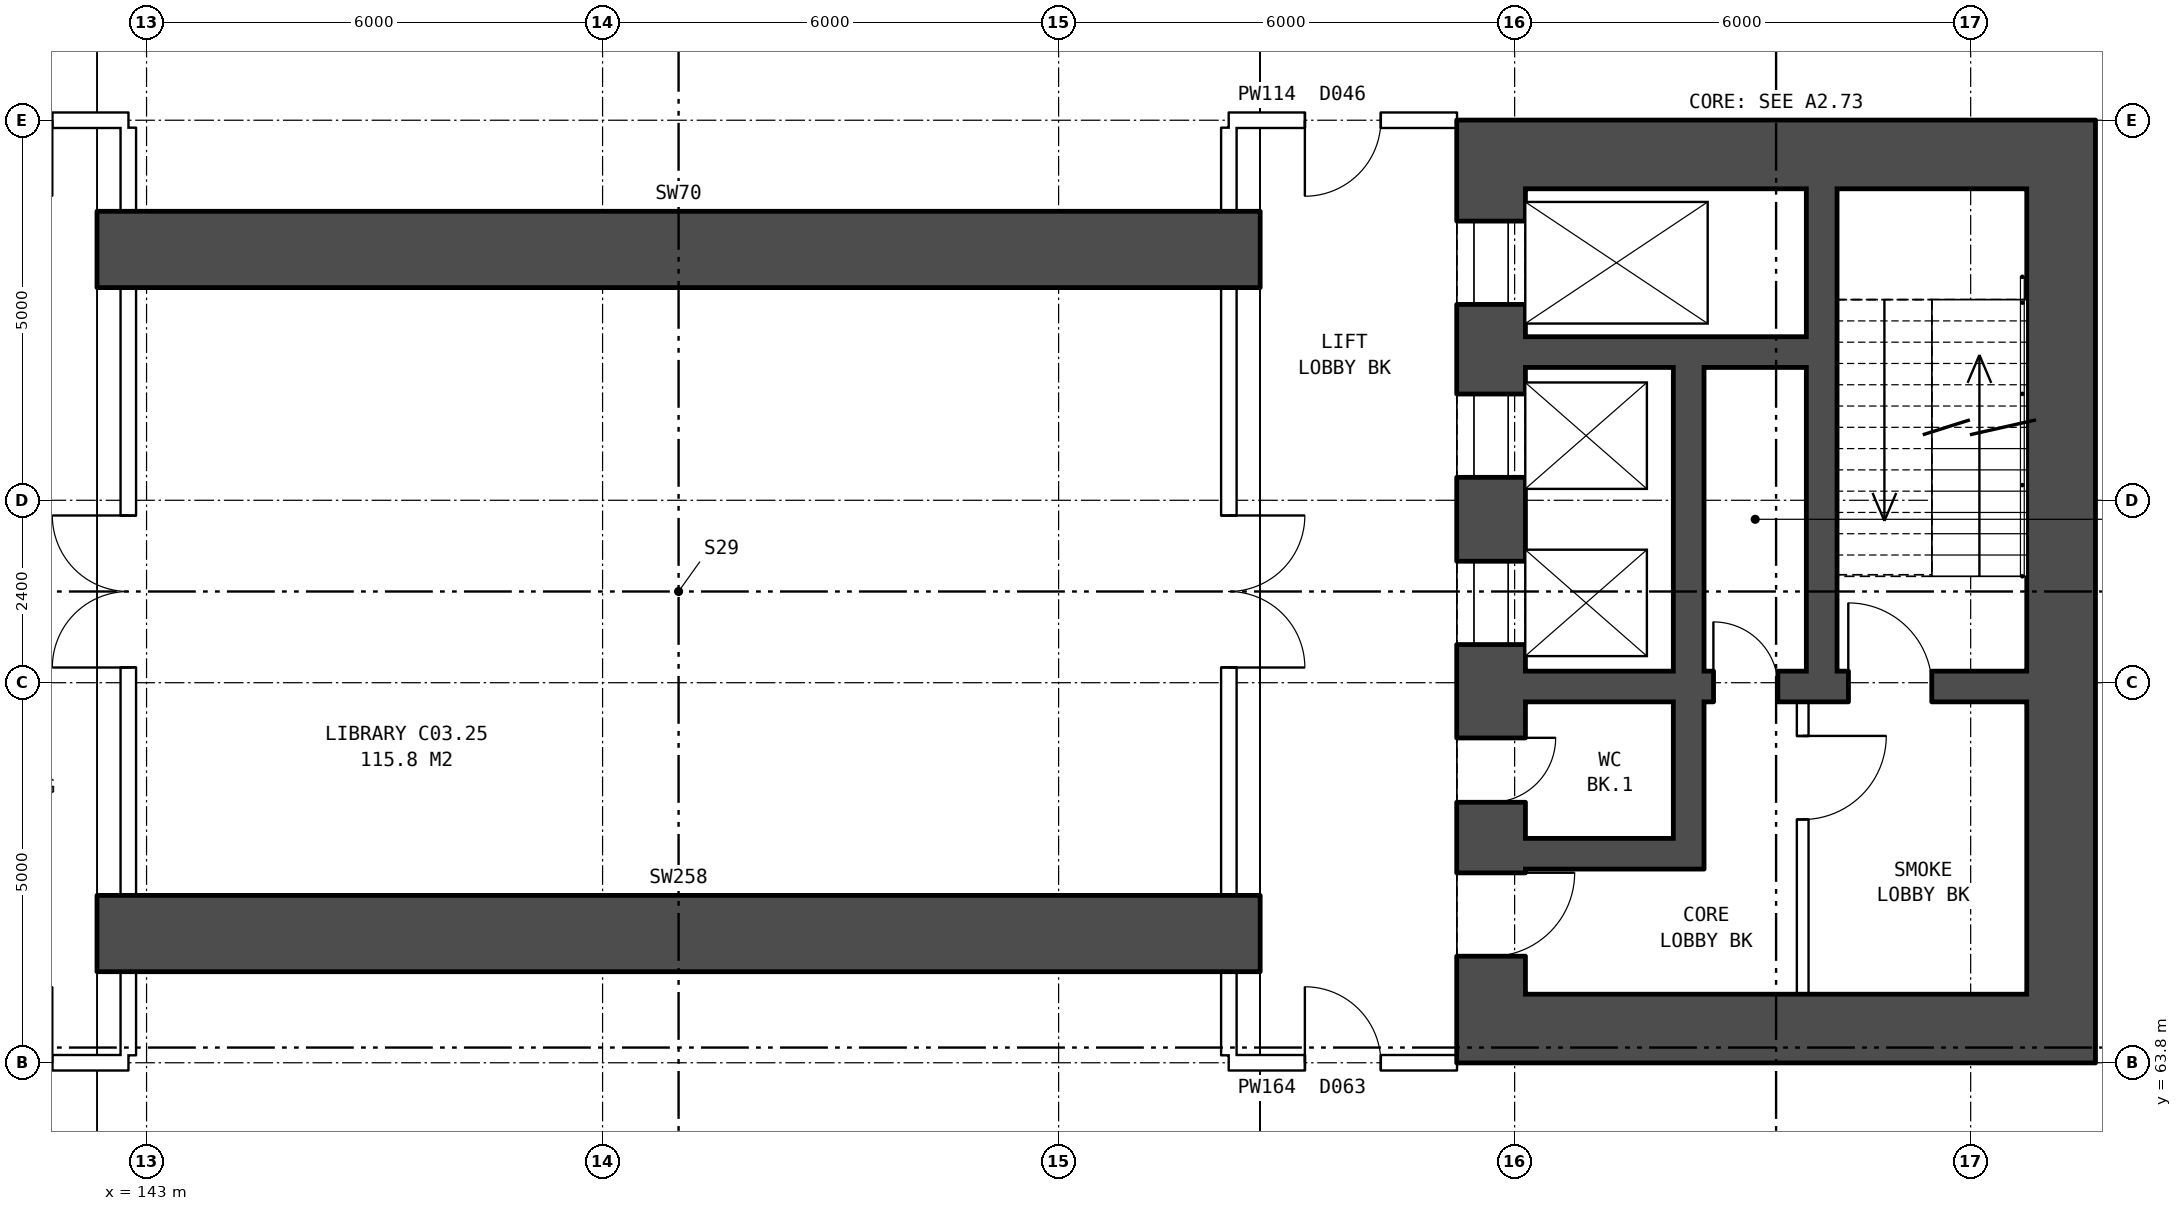
"""IFC4 building model, lengths in metres.
Left out: names, types, materials, properties, quantities, classifications, styles, units other than length and angle.
Written with IfcOpenShell. Run it as: python <this file> out.ifc"""

import sys

from ifc_helpers import new_model, si_unit, direction, frame, frame_2d, origin, place, context, subcontext, project, spatial, rectangle, extrude, element, fill, save


model = new_model("IFC4")
c1 = context("Model", 3, precision=1e-05, world=origin(), true_north=direction((0.0, 1.0)))
c2 = subcontext(c1, "Body", "Model", "MODEL_VIEW")
j1 = project(units=[si_unit("LENGTHUNIT", "METRE"), si_unit("PLANEANGLEUNIT", "RADIAN")], contexts=[c1])
p1 = place(None, origin())
s1 = spatial("IfcSite", under=j1, at=p1, CompositionType="ELEMENT")
p2 = place(p1, origin())
s2 = spatial("IfcBuilding", under=s1, at=p2, CompositionType="ELEMENT")
p3 = place(p2, frame((0.0, 0.0, 14.7)))
s3 = spatial("IfcBuildingStorey", under=s2, at=p3, CompositionType="ELEMENT", Elevation=14.7)
for number, where, z_axis, x_axis in (
    (1, (142.35, 65.5, 0.0), (0.0, 0.0, 1.0), (1.0, 0.0, 0.0)),
    (2, (142.35, 74.5, 0.0), (0.0, 0.0, 1.0), (1.0, 0.0, 0.0)),
):
    element("IfcWall", number, at=place(p3, frame(where, z_axis=z_axis, x_axis=x_axis)), inside=s3, PredefinedType="SHEAR", context=c2, shape_type="SweptSolid", body=[
        extrude(rectangle(XDim=15.3, YDim=1.0, at=frame_2d((7.65, 0.0))), origin(), (0.0, 0.0, 1.0), 4.0),
    ])
p4 = place(p3, frame((142.76, 63.9, 0.0), z_axis=(0.0, 0.0, 1.0), x_axis=(0.0, 1.0, 0.0)))
e3 = element("IfcWall", 3, at=p4, inside=s3, PredefinedType="PARTITIONING", context=c2, shape_type="SweptSolid", body=[
    extrude(rectangle(XDim=12.2, YDim=0.2, at=frame_2d((6.1, 0.0))), origin(), (0.0, 0.0, 1.0), 4.0),
])
p5 = place(p4, frame((5.1, 0.0, 0.0)))
e4 = element("IfcOpeningElement", 4, at=p5, cuts=e3, PredefinedType="OPENING", context=c2, shape_type="SweptSolid", body=[
    extrude(rectangle(XDim=2.0, YDim=2.1, at=frame_2d((1.0, 1.05))), frame((0.0, 0.11, 0.0), z_axis=(0.0, -1.0, 0.0), x_axis=(1.0, 0.0, 0.0)), (0.0, 0.0, 1.0), 0.22),
])
p6 = place(p3, frame((160.69, 75.3, 0.0), z_axis=(0.0, 0.0, 1.0), x_axis=(0.0, -1.0, 0.0)))
e5 = element("IfcWall", 5, at=p6, inside=s3, PredefinedType="SHEAR", context=c2, shape_type="SweptSolid", body=[
    extrude(rectangle(XDim=10.6, YDim=0.9, at=frame_2d((5.3, 0.0))), origin(), (0.0, 0.0, 1.0), 4.0),
])
p7 = place(p6, frame((0.425, 0.0, 0.0)))
e6 = element("IfcOpeningElement", 6, at=p7, cuts=e5, PredefinedType="OPENING", context=c2, shape_type="SweptSolid", body=[
    extrude(rectangle(XDim=1.1, YDim=2.1, at=frame_2d((0.55, 1.05))), frame((0.0, 0.46, 0.0), z_axis=(0.0, -1.0, 0.0), x_axis=(1.0, 0.0, 0.0)), (0.0, 0.0, 1.0), 0.92),
])
p8 = place(p6, frame((2.7, 0.0, 0.0)))
e7 = element("IfcOpeningElement", 7, at=p8, cuts=e5, PredefinedType="OPENING", context=c2, shape_type="SweptSolid", body=[
    extrude(rectangle(XDim=1.1, YDim=2.1, at=frame_2d((0.55, 1.05))), frame((0.0, 0.46, 0.0), z_axis=(0.0, -1.0, 0.0), x_axis=(1.0, 0.0, 0.0)), (0.0, 0.0, 1.0), 0.92),
])
p9 = place(p6, frame((4.9, 0.0, 0.0)))
e8 = element("IfcOpeningElement", 8, at=p9, cuts=e5, PredefinedType="OPENING", context=c2, shape_type="SweptSolid", body=[
    extrude(rectangle(XDim=1.1, YDim=2.1, at=frame_2d((0.55, 1.05))), frame((0.0, 0.46, 0.0), z_axis=(0.0, -1.0, 0.0), x_axis=(1.0, 0.0, 0.0)), (0.0, 0.0, 1.0), 0.92),
])
p10 = place(p6, frame((9.0, 0.0, 0.0)))
e9 = element("IfcOpeningElement", 9, at=p10, cuts=e5, PredefinedType="OPENING", context=c2, shape_type="SweptSolid", body=[
    extrude(rectangle(XDim=1.1, YDim=2.1, at=frame_2d((0.55, 1.05))), frame((0.0, 0.46, 0.0), z_axis=(0.0, -1.0, 0.0), x_axis=(1.0, 0.0, 0.0)), (0.0, 0.0, 1.0), 0.92),
])
p11 = place(p6, frame((7.225, 0.0, 0.0)))
e10 = element("IfcOpeningElement", 10, at=p11, cuts=e5, PredefinedType="OPENING", context=c2, shape_type="SweptSolid", body=[
    extrude(rectangle(XDim=0.85, YDim=2.1, at=frame_2d((0.425, 1.05))), frame((0.0, 0.46, 0.0), z_axis=(0.0, -1.0, 0.0), x_axis=(1.0, 0.0, 0.0)), (0.0, 0.0, 1.0), 0.92),
])
p12 = place(p3, frame((168.19, 75.3, 0.0), z_axis=(0.0, 0.0, 1.0), x_axis=(0.0, -1.0, 0.0)))
e11 = element("IfcWall", 11, at=p12, inside=s3, PredefinedType="SHEAR", context=c2, shape_type="SweptSolid", body=[
    extrude(rectangle(XDim=10.6, YDim=0.9, at=frame_2d((5.3, 0.0))), origin(), (0.0, 0.0, 1.0), 4.0),
])
for number, where, z_axis, x_axis in (
    (12, (160.24, 75.75, 0.0), (0.0, 0.0, 1.0), (1.0, 0.0, 0.0)),
    (13, (160.24, 64.25, 0.0), (0.0, 0.0, 1.0), (1.0, 0.0, 0.0)),
):
    element("IfcWall", number, at=place(p3, frame(where, z_axis=z_axis, x_axis=x_axis)), inside=s3, PredefinedType="SHEAR", context=c2, shape_type="SweptSolid", body=[
        extrude(rectangle(XDim=8.4, YDim=0.9, at=frame_2d((4.2, 0.0))), origin(), (0.0, 0.0, 1.0), 4.0),
    ])
p13 = place(p3, frame((161.14, 73.15, 0.0), z_axis=(0.0, 0.0, 1.0), x_axis=(1.0, 0.0, 0.0)))
e14 = element("IfcWall", 14, at=p13, inside=s3, PredefinedType="SHEAR", context=c2, shape_type="SweptSolid", body=[
    extrude(rectangle(XDim=3.7, YDim=0.4, at=frame_2d((1.85, 0.0))), origin(), (0.0, 0.0, 1.0), 4.0),
])
p14 = place(p3, frame((161.14, 68.75, 0.0), z_axis=(0.0, 0.0, 1.0), x_axis=(1.0, 0.0, 0.0)))
e15 = element("IfcWall", 15, at=p14, inside=s3, PredefinedType="SHEAR", context=c2, shape_type="SweptSolid", body=[
    extrude(rectangle(XDim=6.6, YDim=0.4, at=frame_2d((3.3, 0.0))), origin(), (0.0, 0.0, 1.0), 4.0),
])
p15 = place(p14, frame((4.25, 0.0, 0.0)))
e16 = element("IfcOpeningElement", 16, at=p15, cuts=e15, PredefinedType="OPENING", context=c2, shape_type="SweptSolid", body=[
    extrude(rectangle(XDim=1.1, YDim=2.1, at=frame_2d((0.55, 1.05))), frame((0.0, 0.21, 0.0), z_axis=(0.0, -1.0, 0.0), x_axis=(1.0, 0.0, 0.0)), (0.0, 0.0, 1.0), 0.42),
])
p16 = place(p14, frame((2.475, 0.0, 0.0)))
e17 = element("IfcOpeningElement", 17, at=p16, cuts=e15, PredefinedType="OPENING", context=c2, shape_type="SweptSolid", body=[
    extrude(rectangle(XDim=0.85, YDim=2.1, at=frame_2d((0.425, 1.05))), frame((0.0, 0.21, 0.0), z_axis=(0.0, -1.0, 0.0), x_axis=(1.0, 0.0, 0.0)), (0.0, 0.0, 1.0), 0.42),
])
p17 = place(p3, frame((161.14, 66.55, 0.0), z_axis=(0.0, 0.0, 1.0), x_axis=(1.0, 0.0, 0.0)))
e18 = element("IfcWall", 18, at=p17, inside=s3, PredefinedType="SHEAR", context=c2, shape_type="SweptSolid", body=[
    extrude(rectangle(XDim=1.95, YDim=0.4, at=frame_2d((0.975, 0.0))), origin(), (0.0, 0.0, 1.0), 4.0),
])
p18 = place(p3, frame((163.29, 72.95, 0.0), z_axis=(0.0, 0.0, 1.0), x_axis=(0.0, -1.0, 0.0)))
e19 = element("IfcWall", 19, at=p18, inside=s3, PredefinedType="SHEAR", context=c2, shape_type="SweptSolid", body=[
    extrude(rectangle(XDim=4.0, YDim=0.4, at=frame_2d((2.0, 0.0))), origin(), (0.0, 0.0, 1.0), 4.0),
])
p19 = place(p3, frame((163.29, 68.55, 0.0), z_axis=(0.0, 0.0, 1.0), x_axis=(0.0, -1.0, 0.0)))
e20 = element("IfcWall", 20, at=p19, inside=s3, PredefinedType="SHEAR", context=c2, shape_type="SweptSolid", body=[
    extrude(rectangle(XDim=2.2, YDim=0.4, at=frame_2d((1.1, 0.0))), origin(), (0.0, 0.0, 1.0), 4.0),
])
p20 = place(p3, frame((164.79, 68.55, 0.0), z_axis=(0.0, 0.0, 1.0), x_axis=(0.0, -1.0, 0.0)))
e21 = element("IfcWall", 21, at=p20, inside=s3, PredefinedType="PARTITIONING", context=c2, shape_type="SweptSolid", body=[
    extrude(rectangle(XDim=3.85, YDim=0.15, at=frame_2d((1.925, 0.0))), origin(), (0.0, 0.0, 1.0), 4.0),
])
p21 = place(p20, frame((0.45, 0.0, 0.0)))
e22 = element("IfcOpeningElement", 22, at=p21, cuts=e21, PredefinedType="OPENING", context=c2, shape_type="SweptSolid", body=[
    extrude(rectangle(XDim=1.1, YDim=2.1, at=frame_2d((0.55, 1.05))), frame((0.0, 0.085, 0.0), z_axis=(0.0, -1.0, 0.0), x_axis=(1.0, 0.0, 0.0)), (0.0, 0.0, 1.0), 0.17),
])
p22 = place(p3, frame((165.04, 75.3, 0.0), z_axis=(0.0, 0.0, 1.0), x_axis=(0.0, -1.0, 0.0)))
e23 = element("IfcWall", 23, at=p22, inside=s3, PredefinedType="SHEAR", context=c2, shape_type="SweptSolid", body=[
    extrude(rectangle(XDim=6.35, YDim=0.4, at=frame_2d((3.175, 0.0))), origin(), (0.0, 0.0, 1.0), 4.0),
])
p23 = place(p3, frame((157.24, 63.9, 0.0), z_axis=(0.0, 0.0, 1.0), x_axis=(0.0, 1.0, 0.0)))
e24 = element("IfcWall", 24, at=p23, inside=s3, PredefinedType="PARTITIONING", context=c2, shape_type="SweptSolid", body=[
    extrude(rectangle(XDim=12.2, YDim=0.2, at=frame_2d((6.1, 0.0))), origin(), (0.0, 0.0, 1.0), 4.0),
])
p24 = place(p23, frame((5.1, 0.0, 0.0)))
e25 = element("IfcOpeningElement", 25, at=p24, cuts=e24, PredefinedType="OPENING", context=c2, shape_type="SweptSolid", body=[
    extrude(rectangle(XDim=2.0, YDim=2.1, at=frame_2d((1.0, 1.05))), frame((0.0, 0.11, 0.0), z_axis=(0.0, -1.0, 0.0), x_axis=(1.0, 0.0, 0.0)), (0.0, 0.0, 1.0), 0.22),
])
p25 = place(p3, frame((139.76, 63.8, 0.0), z_axis=(0.0, 0.0, 1.0), x_axis=(1.0, 0.0, 0.0)))
e26 = element("IfcWall", 26, at=p25, inside=s3, PredefinedType="PARTITIONING", context=c2, shape_type="SweptSolid", body=[
    extrude(rectangle(XDim=3.0, YDim=0.2, at=frame_2d((1.5, 0.0))), origin(), (0.0, 0.0, 1.0), 4.0),
])
p26 = place(p25, frame((1.0, 0.0, 0.0)))
e27 = element("IfcOpeningElement", 27, at=p26, cuts=e26, PredefinedType="OPENING", context=c2, shape_type="SweptSolid", body=[
    extrude(rectangle(XDim=1.0, YDim=2.1, at=frame_2d((0.5, 1.05))), frame((0.0, 0.11, 0.0), z_axis=(0.0, -1.0, 0.0), x_axis=(1.0, 0.0, 0.0)), (0.0, 0.0, 1.0), 0.22),
])
p27 = place(p3, frame((157.24, 63.8, 0.0), z_axis=(0.0, 0.0, 1.0), x_axis=(1.0, 0.0, 0.0)))
e28 = element("IfcWall", 28, at=p27, inside=s3, PredefinedType="PARTITIONING", context=c2, shape_type="SweptSolid", body=[
    extrude(rectangle(XDim=3.0, YDim=0.2, at=frame_2d((1.5, 0.0))), origin(), (0.0, 0.0, 1.0), 4.0),
])
p28 = place(p27, frame((1.0, 0.0, 0.0)))
e29 = element("IfcOpeningElement", 29, at=p28, cuts=e28, PredefinedType="OPENING", context=c2, shape_type="SweptSolid", body=[
    extrude(rectangle(XDim=1.0, YDim=2.1, at=frame_2d((0.5, 1.05))), frame((0.0, 0.11, 0.0), z_axis=(0.0, -1.0, 0.0), x_axis=(1.0, 0.0, 0.0)), (0.0, 0.0, 1.0), 0.22),
])
p29 = place(p3, frame((139.76, 76.2, 0.0), z_axis=(0.0, 0.0, 1.0), x_axis=(1.0, 0.0, 0.0)))
e30 = element("IfcWall", 30, at=p29, inside=s3, PredefinedType="PARTITIONING", context=c2, shape_type="SweptSolid", body=[
    extrude(rectangle(XDim=3.0, YDim=0.2, at=frame_2d((1.5, 0.0))), origin(), (0.0, 0.0, 1.0), 4.0),
])
p30 = place(p29, frame((1.0, 0.0, 0.0)))
e31 = element("IfcOpeningElement", 31, at=p30, cuts=e30, PredefinedType="OPENING", context=c2, shape_type="SweptSolid", body=[
    extrude(rectangle(XDim=1.0, YDim=2.1, at=frame_2d((0.5, 1.05))), frame((0.0, 0.11, 0.0), z_axis=(0.0, -1.0, 0.0), x_axis=(1.0, 0.0, 0.0)), (0.0, 0.0, 1.0), 0.22),
])
p31 = place(p3, frame((157.24, 76.2, 0.0), z_axis=(0.0, 0.0, 1.0), x_axis=(1.0, 0.0, 0.0)))
e32 = element("IfcWall", 32, at=p31, inside=s3, PredefinedType="PARTITIONING", context=c2, shape_type="SweptSolid", body=[
    extrude(rectangle(XDim=3.0, YDim=0.2, at=frame_2d((1.5, 0.0))), origin(), (0.0, 0.0, 1.0), 4.0),
])
p32 = place(p31, frame((1.0, 0.0, 0.0)))
e33 = element("IfcOpeningElement", 33, at=p32, cuts=e32, PredefinedType="OPENING", context=c2, shape_type="SweptSolid", body=[
    extrude(rectangle(XDim=1.0, YDim=2.1, at=frame_2d((0.5, 1.05))), frame((0.0, 0.11, 0.0), z_axis=(0.0, -1.0, 0.0), x_axis=(1.0, 0.0, 0.0)), (0.0, 0.0, 1.0), 0.22),
])
p33 = place(p5, origin())
e34 = element("IfcDoor", 34, at=p33, inside=s3, OperationType="DOUBLE_DOOR_SINGLE_SWING", PredefinedType="DOOR", context=c2, shape_type="SweptSolid", body=[
    extrude(rectangle(XDim=2.0, YDim=2.1, at=frame_2d((1.0, 1.05))), frame((0.0, 0.025, 0.0), z_axis=(0.0, -1.0, 0.0), x_axis=(1.0, 0.0, 0.0)), (0.0, 0.0, 1.0), 0.05),
])
fill(e4, e34)
p34 = place(p7, origin())
e35 = element("IfcDoor", 35, at=p34, inside=s3, OperationType="DOUBLE_DOOR_SLIDING", PredefinedType="DOOR", context=c2, shape_type="SweptSolid", body=[
    extrude(rectangle(XDim=1.1, YDim=2.1, at=frame_2d((0.55, 1.05))), frame((0.0, 0.435, 0.0), z_axis=(0.0, -1.0, 0.0), x_axis=(1.0, 0.0, 0.0)), (0.0, 0.0, 1.0), 0.05),
])
fill(e6, e35)
p35 = place(p8, origin())
e36 = element("IfcDoor", 36, at=p35, inside=s3, OperationType="DOUBLE_DOOR_SLIDING", PredefinedType="DOOR", context=c2, shape_type="SweptSolid", body=[
    extrude(rectangle(XDim=1.1, YDim=2.1, at=frame_2d((0.55, 1.05))), frame((0.0, 0.435, 0.0), z_axis=(0.0, -1.0, 0.0), x_axis=(1.0, 0.0, 0.0)), (0.0, 0.0, 1.0), 0.05),
])
fill(e7, e36)
p36 = place(p9, origin())
e37 = element("IfcDoor", 37, at=p36, inside=s3, OperationType="DOUBLE_DOOR_SLIDING", PredefinedType="DOOR", context=c2, shape_type="SweptSolid", body=[
    extrude(rectangle(XDim=1.1, YDim=2.1, at=frame_2d((0.55, 1.05))), frame((0.0, 0.435, 0.0), z_axis=(0.0, -1.0, 0.0), x_axis=(1.0, 0.0, 0.0)), (0.0, 0.0, 1.0), 0.05),
])
fill(e8, e37)
p37 = place(p10, origin())
e38 = element("IfcDoor", 38, at=p37, inside=s3, OperationType="SINGLE_SWING_LEFT", PredefinedType="DOOR", context=c2, shape_type="SweptSolid", body=[
    extrude(rectangle(XDim=1.1, YDim=2.1, at=frame_2d((0.55, 1.05))), frame((0.0, 0.435, 0.0), z_axis=(0.0, -1.0, 0.0), x_axis=(1.0, 0.0, 0.0)), (0.0, 0.0, 1.0), 0.05),
])
fill(e9, e38)
p38 = place(p21, origin())
e39 = element("IfcDoor", 39, at=p38, inside=s3, OperationType="SINGLE_SWING_LEFT", PredefinedType="DOOR", context=c2, shape_type="SweptSolid", body=[
    extrude(rectangle(XDim=1.1, YDim=2.1, at=frame_2d((0.55, 1.05))), frame((0.0, 0.025, 0.0), z_axis=(0.0, -1.0, 0.0), x_axis=(1.0, 0.0, 0.0)), (0.0, 0.0, 1.0), 0.05),
])
fill(e22, e39)
p39 = place(p15, origin())
e40 = element("IfcDoor", 40, at=p39, inside=s3, OperationType="SINGLE_SWING_LEFT", PredefinedType="DOOR", context=c2, shape_type="SweptSolid", body=[
    extrude(rectangle(XDim=1.1, YDim=2.1, at=frame_2d((0.55, 1.05))), frame((0.0, 0.025, 0.0), z_axis=(0.0, -1.0, 0.0), x_axis=(1.0, 0.0, 0.0)), (0.0, 0.0, 1.0), 0.05),
])
fill(e16, e40)
p40 = place(p11, origin())
e41 = element("IfcDoor", 41, at=p40, inside=s3, OperationType="SINGLE_SWING_LEFT", PredefinedType="DOOR", context=c2, shape_type="SweptSolid", body=[
    extrude(rectangle(XDim=0.85, YDim=2.1, at=frame_2d((0.425, 1.05))), frame((0.0, 0.435, 0.0), z_axis=(0.0, -1.0, 0.0), x_axis=(1.0, 0.0, 0.0)), (0.0, 0.0, 1.0), 0.05),
])
fill(e10, e41)
p41 = place(p16, origin())
e42 = element("IfcDoor", 42, at=p41, inside=s3, OperationType="SINGLE_SWING_LEFT", PredefinedType="DOOR", context=c2, shape_type="SweptSolid", body=[
    extrude(rectangle(XDim=0.85, YDim=2.1, at=frame_2d((0.425, 1.05))), frame((0.0, 0.025, 0.0), z_axis=(0.0, -1.0, 0.0), x_axis=(1.0, 0.0, 0.0)), (0.0, 0.0, 1.0), 0.05),
])
fill(e17, e42)
p42 = place(p24, frame((2.0, 0.0, 0.0), z_axis=(0.0, 0.0, 1.0), x_axis=(-1.0, 0.0, 0.0)))
e43 = element("IfcDoor", 43, at=p42, inside=s3, OperationType="DOUBLE_DOOR_SINGLE_SWING", PredefinedType="DOOR", context=c2, shape_type="SweptSolid", body=[
    extrude(rectangle(XDim=2.0, YDim=2.1, at=frame_2d((1.0, 1.05))), frame((0.0, 0.025, 0.0), z_axis=(0.0, -1.0, 0.0), x_axis=(1.0, 0.0, 0.0)), (0.0, 0.0, 1.0), 0.05),
])
fill(e25, e43)
p43 = place(p28, origin())
e44 = element("IfcDoor", 44, at=p43, inside=s3, OperationType="SINGLE_SWING_LEFT", PredefinedType="DOOR", context=c2, shape_type="SweptSolid", body=[
    extrude(rectangle(XDim=1.0, YDim=2.1, at=frame_2d((0.5, 1.05))), frame((0.0, 0.025, 0.0), z_axis=(0.0, -1.0, 0.0), x_axis=(1.0, 0.0, 0.0)), (0.0, 0.0, 1.0), 0.05),
])
fill(e29, e44)
p44 = place(p32, frame((1.0, 0.0, 0.0), z_axis=(0.0, 0.0, 1.0), x_axis=(-1.0, 0.0, 0.0)))
e45 = element("IfcDoor", 45, at=p44, inside=s3, OperationType="SINGLE_SWING_RIGHT", PredefinedType="DOOR", context=c2, shape_type="SweptSolid", body=[
    extrude(rectangle(XDim=1.0, YDim=2.1, at=frame_2d((0.5, 1.05))), frame((0.0, 0.025, 0.0), z_axis=(0.0, -1.0, 0.0), x_axis=(1.0, 0.0, 0.0)), (0.0, 0.0, 1.0), 0.05),
])
fill(e33, e45)
save(model, sys.argv[1])
